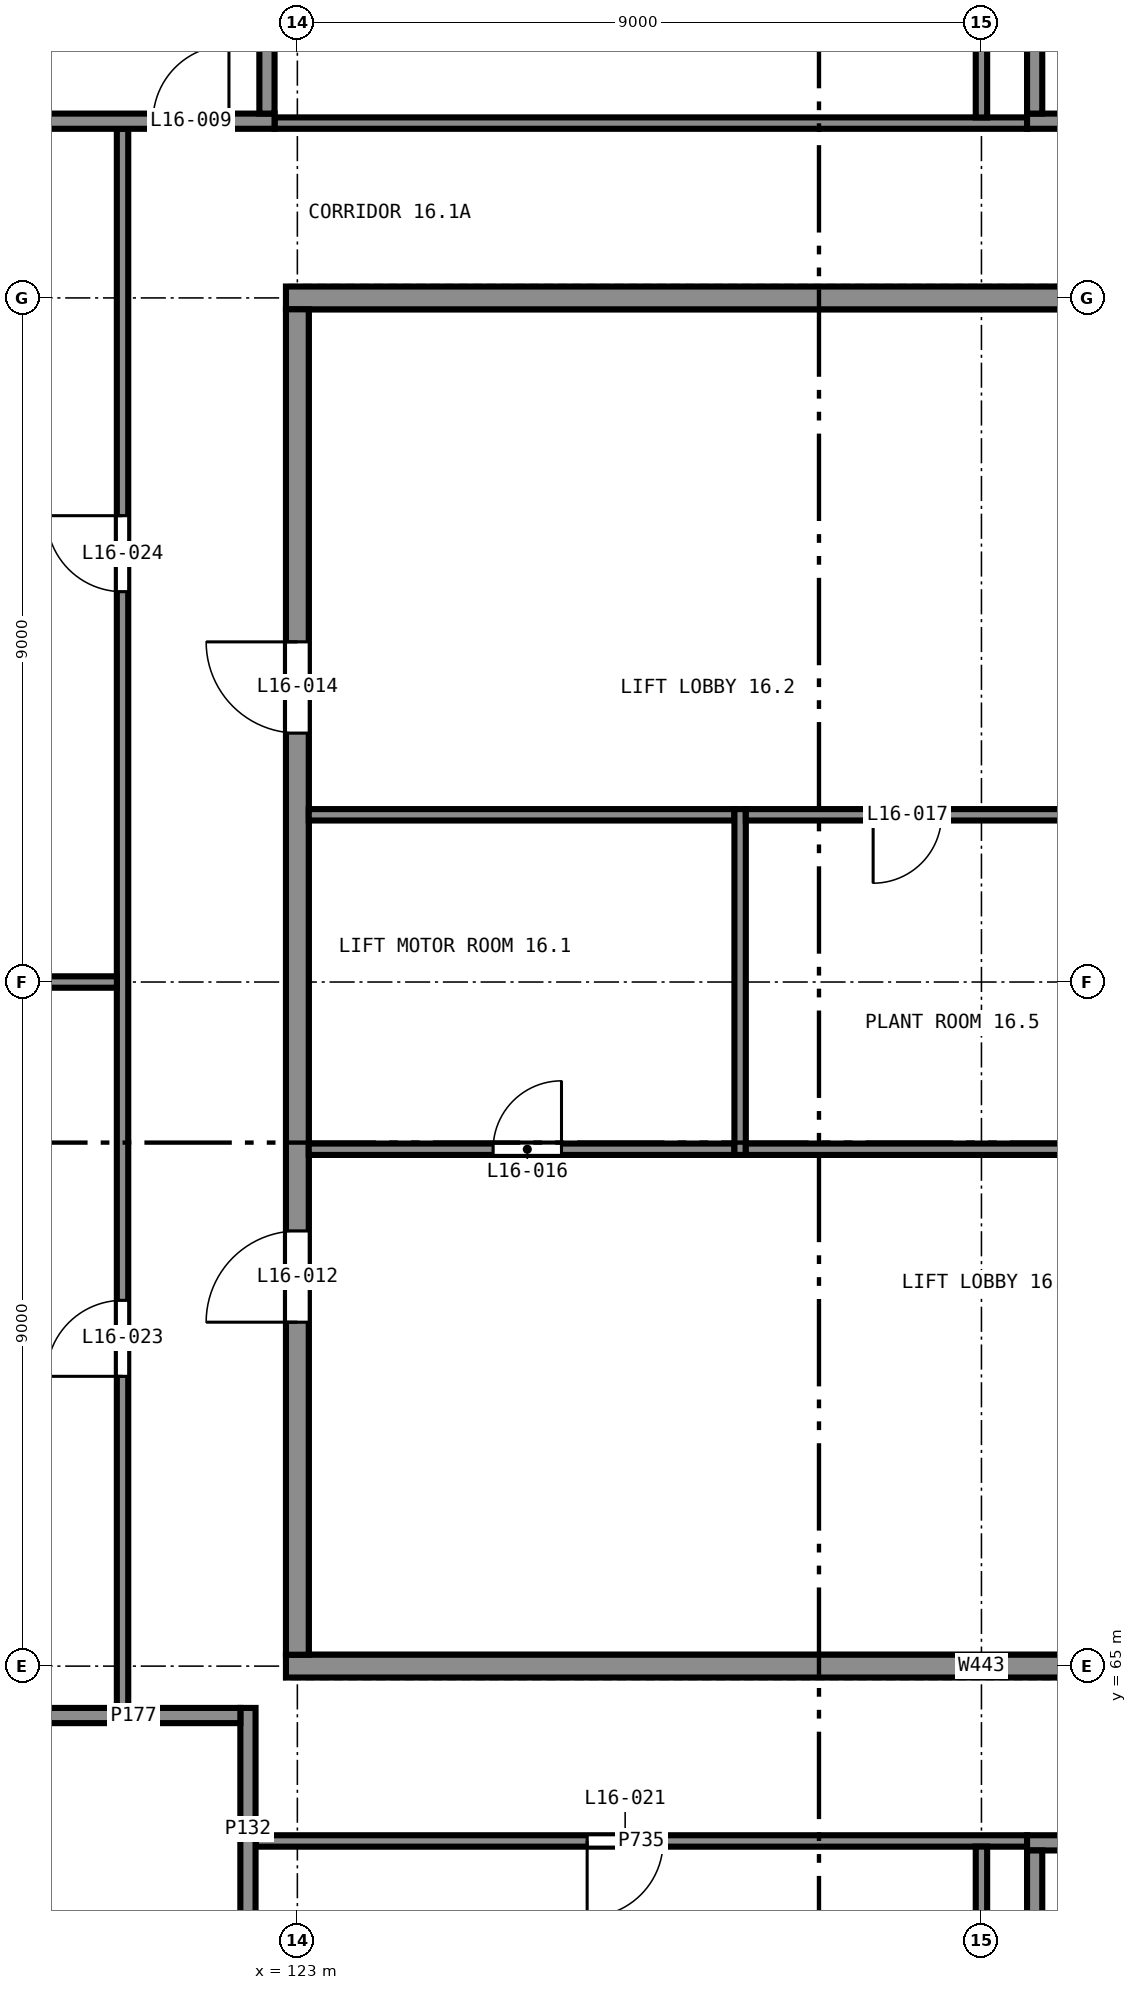
"""IFC4 building model, lengths in metres.
Left out: names, types, materials, properties, quantities, classifications, styles, units other than length and angle.
Written with IfcOpenShell. Run it as: python <this file> out.ifc"""

import sys

from ifc_helpers import new_model, si_unit, direction, frame, frame_2d, origin, place, context, subcontext, project, spatial, polyline, rectangle, outline, extrude, element, fill, save


model = new_model("IFC4")
c1 = context("Model", 3, precision=1e-05, world=origin(), true_north=direction((0.0, 1.0)))
c2 = subcontext(c1, "Body", "Model", "MODEL_VIEW")
j1 = project(units=[si_unit("LENGTHUNIT", "METRE"), si_unit("PLANEANGLEUNIT", "RADIAN")], contexts=[c1])
p1 = place(None, origin())
s1 = spatial("IfcSite", under=j1, at=p1, CompositionType="ELEMENT")
p2 = place(p1, origin())
s2 = spatial("IfcBuilding", under=s1, at=p2, CompositionType="ELEMENT")
p3 = place(p2, frame((0.0, 0.0, 65.5)))
s3 = spatial("IfcBuildingStorey", under=s2, at=p3, CompositionType="ELEMENT", Elevation=65.5)
for number, where, z_axis, x_axis in (
    (1, (122.85, 65.0, 0.0), (0.0, 0.0, 1.0), (1.0, 0.0, 0.0)),
    (2, (141.15, 83.0, 0.0), (0.0, 0.0, 1.0), (-1.0, 0.0, 0.0)),
):
    element("IfcWall", number, at=place(p3, frame(where, z_axis=z_axis, x_axis=x_axis)), inside=s3, PredefinedType="SHEAR", context=c2, shape_type="SweptSolid", body=[
        extrude(rectangle(XDim=18.3, YDim=0.3, at=frame_2d((9.15, 0.0))), origin(), (0.0, 0.0, 1.0), 4.7),
    ])
p4 = place(p3, frame((123.0, 82.85, 0.0), z_axis=(0.0, 0.0, 1.0), x_axis=(0.0, -1.0, 0.0)))
e3 = element("IfcWall", 3, at=p4, inside=s3, PredefinedType="SHEAR", context=c2, shape_type="SweptSolid", body=[
    extrude(rectangle(XDim=17.7, YDim=0.3, at=frame_2d((8.85, 0.0))), origin(), (0.0, 0.0, 1.0), 4.7),
])
p5 = place(p4, frame((12.125, 0.0, 0.0)))
e4 = element("IfcOpeningElement", 4, at=p5, cuts=e3, PredefinedType="OPENING", context=c2, shape_type="SweptSolid", body=[
    extrude(rectangle(XDim=1.2, YDim=2.1, at=frame_2d((0.6, 1.05))), frame((0.0, 0.16, 0.0), z_axis=(0.0, -1.0, 0.0), x_axis=(1.0, 0.0, 0.0)), (0.0, 0.0, 1.0), 0.32),
])
p6 = place(p4, frame((4.375, 0.0, 0.0)))
e5 = element("IfcOpeningElement", 5, at=p6, cuts=e3, PredefinedType="OPENING", context=c2, shape_type="SweptSolid", body=[
    extrude(rectangle(XDim=1.2, YDim=2.1, at=frame_2d((0.6, 1.05))), frame((0.0, 0.16, 0.0), z_axis=(0.0, -1.0, 0.0), x_axis=(1.0, 0.0, 0.0)), (0.0, 0.0, 1.0), 0.32),
])
p7 = place(p3, frame((122.35, 64.45, 0.0), z_axis=(0.0, 0.0, 1.0), x_axis=(0.0, -1.0, 0.0)))
e6 = element("IfcWall", 6, at=p7, inside=s3, PredefinedType="SOLIDWALL", context=c2, shape_type="SweptSolid", body=[
    extrude(rectangle(XDim=3.192, YDim=0.2, at=frame_2d((1.596, 0.0))), origin(), (0.0, 0.0, 1.0), 4.7),
])
p8 = place(p3, frame((119.442, 64.35, 0.0), z_axis=(0.0, 0.0, 1.0), x_axis=(1.0, 0.0, 0.0)))
e7 = element("IfcWall", 7, at=p8, inside=s3, PredefinedType="SOLIDWALL", context=c2, shape_type="SweptSolid", body=[
    extrude(rectangle(XDim=2.808, YDim=0.2, at=frame_2d((1.404, 0.0))), origin(), (0.0, 0.0, 1.0), 4.7),
])
p9 = place(p3, frame((140.4, 62.675, 0.0), z_axis=(0.0, 0.0, 1.0), x_axis=(-1.0, 0.0, 0.0)))
e8 = element("IfcWall", 8, at=p9, inside=s3, PredefinedType="SHEAR", context=c2, shape_type="SweptSolid", body=[
    extrude(rectangle(XDim=7.8, YDim=0.2, at=frame_2d((3.9, 0.0))), origin(), (0.0, 0.0, 1.0), 4.7),
])
p10 = place(p9, frame((6.2, 0.0, 0.0)))
e9 = element("IfcOpeningElement", 9, at=p10, cuts=e8, PredefinedType="OPENING", context=c2, shape_type="SweptSolid", body=[
    extrude(rectangle(XDim=1.0, YDim=2.1, at=frame_2d((0.5, 1.05))), frame((0.0, 0.11, 0.0), z_axis=(0.0, -1.0, 0.0), x_axis=(1.0, 0.0, 0.0)), (0.0, 0.0, 1.0), 0.22),
])
p11 = place(p3, frame((132.7, 62.575, 0.0), z_axis=(0.0, 0.0, 1.0), x_axis=(0.0, -1.0, 0.0)))
e10 = element("IfcWall", 10, at=p11, inside=s3, PredefinedType="SHEAR", context=c2, shape_type="SweptSolid", body=[
    extrude(rectangle(XDim=3.4, YDim=0.2, at=frame_2d((1.7, 0.0))), origin(), (0.0, 0.0, 1.0), 4.7),
])
p12 = place(p3, frame((132.6, 85.325, 0.0), z_axis=(0.0, 0.0, 1.0), x_axis=(1.0, 0.0, 0.0)))
e11 = element("IfcWall", 11, at=p12, inside=s3, PredefinedType="SHEAR", context=c2, shape_type="SweptSolid", body=[
    extrude(rectangle(XDim=7.8, YDim=0.2, at=frame_2d((3.9, 0.0))), origin(), (0.0, 0.0, 1.0), 4.7),
])
p13 = place(p12, frame((0.6, 0.0, 0.0)))
e12 = element("IfcOpeningElement", 12, at=p13, cuts=e11, PredefinedType="OPENING", context=c2, shape_type="SweptSolid", body=[
    extrude(rectangle(XDim=1.0, YDim=2.1, at=frame_2d((0.5, 1.05))), frame((0.0, 0.11, 0.0), z_axis=(0.0, -1.0, 0.0), x_axis=(1.0, 0.0, 0.0)), (0.0, 0.0, 1.0), 0.22),
])
p14 = place(p3, frame((132.7, 88.825, 0.0), z_axis=(0.0, 0.0, 1.0), x_axis=(0.0, -1.0, 0.0)))
e13 = element("IfcWall", 13, at=p14, inside=s3, PredefinedType="SHEAR", context=c2, shape_type="SweptSolid", body=[
    extrude(rectangle(XDim=3.4, YDim=0.2, at=frame_2d((1.7, 0.0))), origin(), (0.0, 0.0, 1.0), 4.7),
])
p15 = place(p3, frame((114.9, 85.325, 0.0), z_axis=(0.0, 0.0, 1.0), x_axis=(1.0, 0.0, 0.0)))
e14 = element("IfcWall", 14, at=p15, inside=s3, PredefinedType="SHEAR", context=c2, shape_type="SweptSolid", body=[
    extrude(rectangle(XDim=7.8, YDim=0.2, at=frame_2d((3.9, 0.0))), origin(), (0.0, 0.0, 1.0), 4.7),
])
p16 = place(p15, frame((6.2, 0.0, 0.0)))
e15 = element("IfcOpeningElement", 15, at=p16, cuts=e14, PredefinedType="OPENING", context=c2, shape_type="SweptSolid", body=[
    extrude(rectangle(XDim=1.0, YDim=2.1, at=frame_2d((0.5, 1.05))), frame((0.0, 0.11, 0.0), z_axis=(0.0, -1.0, 0.0), x_axis=(1.0, 0.0, 0.0)), (0.0, 0.0, 1.0), 0.22),
])
p17 = place(p3, frame((122.6, 85.425, 0.0), z_axis=(0.0, 0.0, 1.0), x_axis=(0.0, 1.0, 0.0)))
e16 = element("IfcWall", 16, at=p17, inside=s3, PredefinedType="SHEAR", context=c2, shape_type="SweptSolid", body=[
    extrude(rectangle(XDim=3.4, YDim=0.2, at=frame_2d((1.7, 0.0))), origin(), (0.0, 0.0, 1.0), 4.7),
])
p18 = place(p3, frame((140.4, 62.675, 5.0), z_axis=(0.0, 0.0, 1.0), x_axis=(-1.0, 0.0, 0.0)))
e17 = element("IfcWall", 17, at=p18, inside=s3, PredefinedType="SHEAR", context=c2, shape_type="SweptSolid", body=[
    extrude(outline(polyline([(0.0, 0.0), (7.8, 0.0), (7.8, 3.591), (0.0, 3.591), (0.0, 0.0)])), frame((0.0, 0.1, 0.0), z_axis=(0.0, -1.0, 0.0), x_axis=(1.0, 0.0, 0.0)), (0.0, 0.0, 1.0), 0.2),
])
p19 = place(p3, frame((132.7, 62.575, 5.0), z_axis=(0.0, 0.0, 1.0), x_axis=(0.0, -1.0, 0.0)))
e18 = element("IfcWall", 18, at=p19, inside=s3, PredefinedType="SHEAR", context=c2, shape_type="SweptSolid", body=[
    extrude(outline(polyline([(0.0, 0.0), (3.4, 0.0), (3.4, 2.654), (0.0, 3.565), (0.0, 0.0)])), frame((0.0, 0.1, 0.0), z_axis=(0.0, -1.0, 0.0), x_axis=(1.0, 0.0, 0.0)), (0.0, 0.0, 1.0), 0.2),
])
p20 = place(p19, frame((1.2, 0.0, 0.0)))
e19 = element("IfcOpeningElement", 19, at=p20, cuts=e18, PredefinedType="OPENING", context=c2, shape_type="SweptSolid", body=[
    extrude(rectangle(XDim=1.0, YDim=2.1, at=frame_2d((0.5, 1.05))), frame((0.0, 0.11, 0.0), z_axis=(0.0, -1.0, 0.0), x_axis=(1.0, 0.0, 0.0)), (0.0, 0.0, 1.0), 0.22),
])
p21 = place(p3, frame((132.6, 85.325, 5.0), z_axis=(0.0, 0.0, 1.0), x_axis=(1.0, 0.0, 0.0)))
e20 = element("IfcWall", 20, at=p21, inside=s3, PredefinedType="SHEAR", context=c2, shape_type="SweptSolid", body=[
    extrude(outline(polyline([(0.0, 0.0), (7.8, 0.0), (7.8, 3.591), (0.0, 3.591), (0.0, 0.0)])), frame((0.0, 0.1, 0.0), z_axis=(0.0, -1.0, 0.0), x_axis=(1.0, 0.0, 0.0)), (0.0, 0.0, 1.0), 0.2),
])
p22 = place(p3, frame((132.7, 88.825, 5.0), z_axis=(0.0, 0.0, 1.0), x_axis=(0.0, -1.0, 0.0)))
e21 = element("IfcWall", 21, at=p22, inside=s3, PredefinedType="SHEAR", context=c2, shape_type="SweptSolid", body=[
    extrude(outline(polyline([(0.0, 0.0), (3.4, 0.0), (3.4, 3.565), (0.0, 2.654), (0.0, 0.0)])), frame((0.0, 0.1, 0.0), z_axis=(0.0, -1.0, 0.0), x_axis=(1.0, 0.0, 0.0)), (0.0, 0.0, 1.0), 0.2),
])
p23 = place(p22, frame((1.2, 0.0, 0.0)))
e22 = element("IfcOpeningElement", 22, at=p23, cuts=e21, PredefinedType="OPENING", context=c2, shape_type="SweptSolid", body=[
    extrude(rectangle(XDim=1.0, YDim=2.1, at=frame_2d((0.5, 1.05))), frame((0.0, 0.11, 0.0), z_axis=(0.0, -1.0, 0.0), x_axis=(1.0, 0.0, 0.0)), (0.0, 0.0, 1.0), 0.22),
])
p24 = place(p3, frame((128.825, 71.725, 0.0), z_axis=(0.0, 0.0, 1.0), x_axis=(0.0, 1.0, 0.0)))
e23 = element("IfcWall", 23, at=p24, inside=s3, PredefinedType="PARTITIONING", context=c2, shape_type="SweptSolid", body=[
    extrude(rectangle(XDim=4.55, YDim=0.15, at=frame_2d((2.275, 0.0))), origin(), (0.0, 0.0, 1.0), 4.7),
])
p25 = place(p3, frame((123.15, 71.8, 0.0), z_axis=(0.0, 0.0, 1.0), x_axis=(1.0, 0.0, 0.0)))
e24 = element("IfcWall", 24, at=p25, inside=s3, PredefinedType="PARTITIONING", context=c2, shape_type="SweptSolid", body=[
    extrude(rectangle(XDim=5.6, YDim=0.15, at=frame_2d((2.8, 0.0))), origin(), (0.0, 0.0, 1.0), 4.7),
])
p26 = place(p25, frame((2.425, 0.0, 0.0)))
e25 = element("IfcOpeningElement", 25, at=p26, cuts=e24, PredefinedType="OPENING", context=c2, shape_type="SweptSolid", body=[
    extrude(rectangle(XDim=0.9, YDim=2.1, at=frame_2d((0.45, 1.05))), frame((0.0, 0.085, 0.0), z_axis=(0.0, -1.0, 0.0), x_axis=(1.0, 0.0, 0.0)), (0.0, 0.0, 1.0), 0.17),
])
p27 = place(p3, frame((123.15, 76.2, 0.0), z_axis=(0.0, 0.0, 1.0), x_axis=(1.0, 0.0, 0.0)))
e26 = element("IfcWall", 26, at=p27, inside=s3, PredefinedType="PARTITIONING", context=c2, shape_type="SweptSolid", body=[
    extrude(rectangle(XDim=5.6, YDim=0.15, at=frame_2d((2.8, 0.0))), origin(), (0.0, 0.0, 1.0), 4.7),
])
p28 = place(p3, frame((128.9, 71.8, 0.0), z_axis=(0.0, 0.0, 1.0), x_axis=(1.0, 0.0, 0.0)))
e27 = element("IfcWall", 27, at=p28, inside=s3, PredefinedType="PARTITIONING", context=c2, shape_type="SweptSolid", body=[
    extrude(rectangle(XDim=4.25, YDim=0.15, at=frame_2d((2.125, 0.0))), origin(), (0.0, 0.0, 1.0), 4.7),
])
p29 = place(p3, frame((128.9, 76.2, 0.0), z_axis=(0.0, 0.0, 1.0), x_axis=(1.0, 0.0, 0.0)))
e28 = element("IfcWall", 28, at=p29, inside=s3, PredefinedType="PARTITIONING", context=c2, shape_type="SweptSolid", body=[
    extrude(rectangle(XDim=4.25, YDim=0.15, at=frame_2d((2.125, 0.0))), origin(), (0.0, 0.0, 1.0), 4.7),
])
p30 = place(p29, frame((1.675, 0.0, 0.0)))
e29 = element("IfcOpeningElement", 29, at=p30, cuts=e28, PredefinedType="OPENING", context=c2, shape_type="SweptSolid", body=[
    extrude(rectangle(XDim=0.9, YDim=2.1, at=frame_2d((0.45, 1.05))), frame((0.0, 0.085, 0.0), z_axis=(0.0, -1.0, 0.0), x_axis=(1.0, 0.0, 0.0)), (0.0, 0.0, 1.0), 0.17),
])
p31 = place(p3, frame((132.6, 62.7, 0.0), z_axis=(0.0, 0.0, 1.0), x_axis=(-1.0, 0.0, 0.0)))
e30 = element("IfcWall", 30, at=p31, inside=s3, PredefinedType="PARTITIONING", context=c2, shape_type="SweptSolid", body=[
    extrude(rectangle(XDim=10.15, YDim=0.15, at=frame_2d((5.075, 0.0))), origin(), (0.0, 0.0, 1.0), 4.7),
])
p32 = place(p31, frame((4.788, 0.0, 0.0)))
e31 = element("IfcOpeningElement", 31, at=p32, cuts=e30, PredefinedType="OPENING", context=c2, shape_type="SweptSolid", body=[
    extrude(rectangle(XDim=1.0, YDim=2.1, at=frame_2d((0.5, 1.05))), frame((0.0, 0.085, 0.0), z_axis=(0.0, -1.0, 0.0), x_axis=(1.0, 0.0, 0.0)), (0.0, 0.0, 1.0), 0.17),
])
p33 = place(p3, frame((120.7, 64.45, 0.0), z_axis=(0.0, 0.0, 1.0), x_axis=(0.0, 1.0, 0.0)))
e32 = element("IfcWall", 32, at=p33, inside=s3, PredefinedType="PARTITIONING", context=c2, shape_type="SweptSolid", body=[
    extrude(rectangle(XDim=20.775, YDim=0.15, at=frame_2d((10.388, 0.0))), origin(), (0.0, 0.0, 1.0), 4.7),
])
p34 = place(p33, frame((4.363, 0.0, 0.0)))
e33 = element("IfcOpeningElement", 33, at=p34, cuts=e32, PredefinedType="OPENING", context=c2, shape_type="SweptSolid", body=[
    extrude(rectangle(XDim=1.0, YDim=2.1, at=frame_2d((0.5, 1.05))), frame((0.0, 0.085, 0.0), z_axis=(0.0, -1.0, 0.0), x_axis=(1.0, 0.0, 0.0)), (0.0, 0.0, 1.0), 0.17),
])
p35 = place(p33, frame((14.685, 0.0, 0.0)))
e34 = element("IfcOpeningElement", 34, at=p35, cuts=e32, PredefinedType="OPENING", context=c2, shape_type="SweptSolid", body=[
    extrude(rectangle(XDim=1.0, YDim=2.1, at=frame_2d((0.5, 1.05))), frame((0.0, 0.085, 0.0), z_axis=(0.0, -1.0, 0.0), x_axis=(1.0, 0.0, 0.0)), (0.0, 0.0, 1.0), 0.17),
])
p36 = place(p3, frame((122.7, 85.3, 0.0), z_axis=(0.0, 0.0, 1.0), x_axis=(1.0, 0.0, 0.0)))
e35 = element("IfcWall", 35, at=p36, inside=s3, PredefinedType="PARTITIONING", context=c2, shape_type="SweptSolid", body=[
    extrude(rectangle(XDim=9.9, YDim=0.15, at=frame_2d((4.95, 0.0))), origin(), (0.0, 0.0, 1.0), 4.7),
])
for number, where, z_axis, x_axis in (
    (36, (132.0, 55.449, 0.0), (0.0, 0.0, 1.0), (0.0, 1.0, 0.0)),
    (37, (132.0, 85.374, 0.0), (0.0, 0.0, 1.0), (0.0, 1.0, 0.0)),
    (38, (113.449, 74.0, 0.0), (0.0, 0.0, 1.0), (1.0, 0.0, 0.0)),
):
    element("IfcWall", number, at=place(p3, frame(where, z_axis=z_axis, x_axis=x_axis)), inside=s3, PredefinedType="PARTITIONING", context=c2, shape_type="SweptSolid", body=[
        extrude(rectangle(XDim=7.177, YDim=0.15, at=frame_2d((3.588, 0.0))), origin(), (0.0, 0.0, 1.0), 3.8),
    ])
p37 = place(p16, origin())
e39 = element("IfcDoor", 39, at=p37, inside=s3, OperationType="SINGLE_SWING_LEFT", PredefinedType="DOOR", context=c2, shape_type="SweptSolid", body=[
    extrude(rectangle(XDim=1.0, YDim=2.1, at=frame_2d((0.5, 1.05))), frame((0.0, 0.025, 0.0), z_axis=(0.0, -1.0, 0.0), x_axis=(1.0, 0.0, 0.0)), (0.0, 0.0, 1.0), 0.05),
])
fill(e15, e39)
p38 = place(p5, frame((1.2, 0.0, 0.0), z_axis=(0.0, 0.0, 1.0), x_axis=(-1.0, 0.0, 0.0)))
e40 = element("IfcDoor", 40, at=p38, inside=s3, OperationType="SINGLE_SWING_RIGHT", PredefinedType="DOOR", context=c2, shape_type="SweptSolid", body=[
    extrude(rectangle(XDim=1.2, YDim=2.1, at=frame_2d((0.6, 1.05))), frame((0.0, 0.025, 0.0), z_axis=(0.0, -1.0, 0.0), x_axis=(1.0, 0.0, 0.0)), (0.0, 0.0, 1.0), 0.05),
])
fill(e4, e40)
p39 = place(p6, frame((1.2, 0.0, 0.0), z_axis=(0.0, 0.0, 1.0), x_axis=(-1.0, 0.0, 0.0)))
e41 = element("IfcDoor", 41, at=p39, inside=s3, OperationType="SINGLE_SWING_LEFT", PredefinedType="DOOR", context=c2, shape_type="SweptSolid", body=[
    extrude(rectangle(XDim=1.2, YDim=2.1, at=frame_2d((0.6, 1.05))), frame((0.0, 0.025, 0.0), z_axis=(0.0, -1.0, 0.0), x_axis=(1.0, 0.0, 0.0)), (0.0, 0.0, 1.0), 0.05),
])
fill(e5, e41)
p40 = place(p26, origin())
e42 = element("IfcDoor", 42, at=p40, inside=s3, OperationType="SINGLE_SWING_LEFT", PredefinedType="DOOR", context=c2, shape_type="SweptSolid", body=[
    extrude(rectangle(XDim=0.9, YDim=2.1, at=frame_2d((0.45, 1.05))), frame((0.0, 0.025, 0.0), z_axis=(0.0, -1.0, 0.0), x_axis=(1.0, 0.0, 0.0)), (0.0, 0.0, 1.0), 0.05),
])
fill(e25, e42)
p41 = place(p30, frame((0.9, 0.0, 0.0), z_axis=(0.0, 0.0, 1.0), x_axis=(-1.0, 0.0, 0.0)))
e43 = element("IfcDoor", 43, at=p41, inside=s3, OperationType="SINGLE_SWING_LEFT", PredefinedType="DOOR", context=c2, shape_type="SweptSolid", body=[
    extrude(rectangle(XDim=0.9, YDim=2.1, at=frame_2d((0.45, 1.05))), frame((0.0, 0.025, 0.0), z_axis=(0.0, -1.0, 0.0), x_axis=(1.0, 0.0, 0.0)), (0.0, 0.0, 1.0), 0.05),
])
fill(e29, e43)
p42 = place(p32, origin())
e44 = element("IfcDoor", 44, at=p42, inside=s3, OperationType="SINGLE_SWING_LEFT", PredefinedType="DOOR", context=c2, shape_type="SweptSolid", body=[
    extrude(rectangle(XDim=1.0, YDim=2.1, at=frame_2d((0.5, 1.05))), frame((0.0, 0.025, 0.0), z_axis=(0.0, -1.0, 0.0), x_axis=(1.0, 0.0, 0.0)), (0.0, 0.0, 1.0), 0.05),
])
fill(e31, e44)
p43 = place(p34, origin())
e45 = element("IfcDoor", 45, at=p43, inside=s3, OperationType="SINGLE_SWING_RIGHT", PredefinedType="DOOR", context=c2, shape_type="SweptSolid", body=[
    extrude(rectangle(XDim=1.0, YDim=2.1, at=frame_2d((0.5, 1.05))), frame((0.0, 0.025, 0.0), z_axis=(0.0, -1.0, 0.0), x_axis=(1.0, 0.0, 0.0)), (0.0, 0.0, 1.0), 0.05),
])
fill(e33, e45)
p44 = place(p35, origin())
e46 = element("IfcDoor", 46, at=p44, inside=s3, OperationType="SINGLE_SWING_LEFT", PredefinedType="DOOR", context=c2, shape_type="SweptSolid", body=[
    extrude(rectangle(XDim=1.0, YDim=2.1, at=frame_2d((0.5, 1.05))), frame((0.0, 0.025, 0.0), z_axis=(0.0, -1.0, 0.0), x_axis=(1.0, 0.0, 0.0)), (0.0, 0.0, 1.0), 0.05),
])
fill(e34, e46)
save(model, sys.argv[1])
